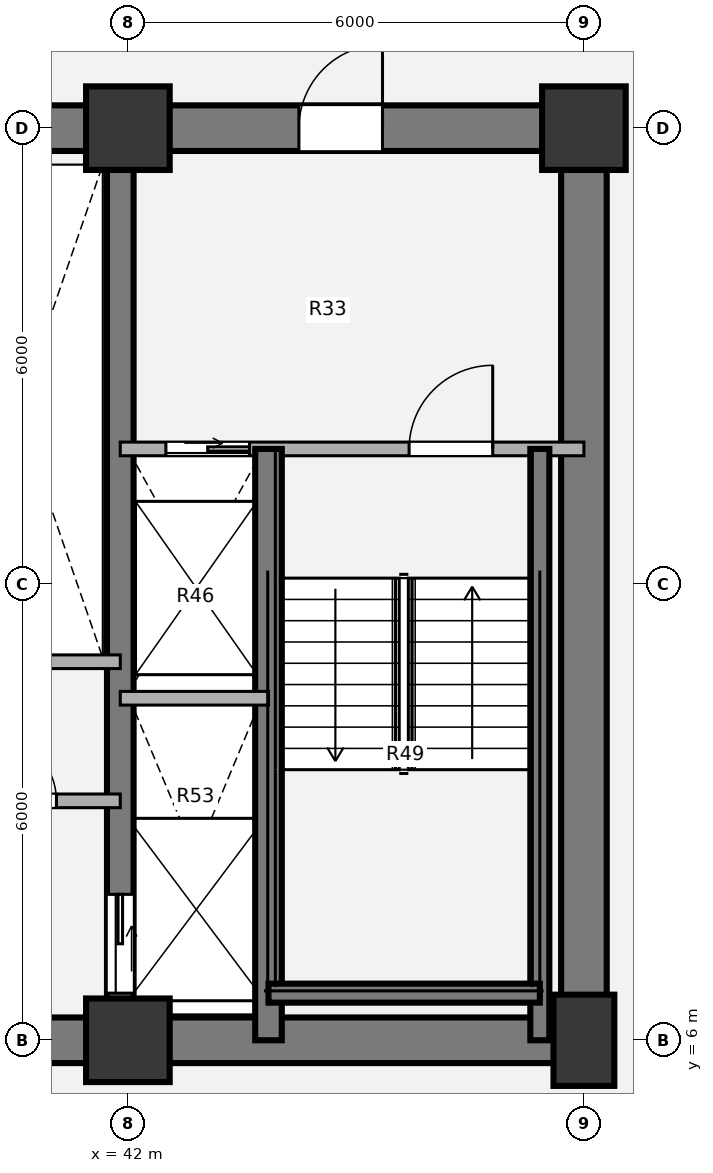
"""IFC4 building model, lengths in metres.
Left out: names, types, materials, properties, quantities, classifications, styles, units other than length and angle.
Written with IfcOpenShell. Run it as: python <this file> out.ifc"""

import sys

from ifc_helpers import new_model, si_unit, direction, frame, frame_2d, origin, origin_2d, place, context, subcontext, project, spatial, rectangle, extrude, source, transform, mapped, element, fill, save


model = new_model("IFC4")
c1 = context("Model", 3, precision=1e-05, world=origin(), true_north=direction((0.0, 1.0)))
c2 = subcontext(c1, "Body", "Model", "MODEL_VIEW")
j1 = project(units=[si_unit("LENGTHUNIT", "METRE"), si_unit("PLANEANGLEUNIT", "RADIAN")], contexts=[c1])
p1 = place(None, origin())
s1 = spatial("IfcSite", under=j1, at=p1, CompositionType="ELEMENT")
p2 = place(p1, origin())
s2 = spatial("IfcBuilding", under=s1, at=p2, CompositionType="ELEMENT")
p3 = place(p2, frame((0.0, 0.0, 68.58)))
s3 = spatial("IfcBuildingStorey", under=s2, at=p3, CompositionType="ELEMENT", Elevation=68.58)
m1 = source(origin(), c2, "Body", "SweptSolid", [
    extrude(rectangle(XDim=1.1, YDim=1.1, at=origin_2d()), origin(), (0.0, 0.0, 1.0), 3.78),
])
p4 = place(p3, frame((42.0, 6.0, 0.0), z_axis=(0.0, 0.0, 1.0), x_axis=(1.0, 0.0, 0.0)))
e1 = element("IfcColumn", 1, at=p4, inside=s3, PredefinedType="COLUMN", context=c2, shape_type="MappedRepresentation", body=[
    mapped(m1, transform((0.0, 0.0, 0.0), x_axis=(1.0, 0.0, 0.0), y_axis=(0.0, 1.0, 0.0), z_axis=(0.0, 0.0, 1.0), scale=1.0)),
])
m2 = source(origin(), c2, "Body", "SweptSolid", [
    extrude(rectangle(XDim=0.8, YDim=1.2, at=origin_2d()), origin(), (0.0, 0.0, 1.0), 3.78),
])
p5 = place(p3, frame((48.0, 6.0, 0.0), z_axis=(0.0, 0.0, 1.0), x_axis=(1.0, 0.0, 0.0)))
e2 = element("IfcColumn", 2, at=p5, inside=s3, PredefinedType="COLUMN", context=c2, shape_type="MappedRepresentation", body=[
    mapped(m2, transform((0.0, 0.0, 0.0), x_axis=(1.0, 0.0, 0.0), y_axis=(0.0, 1.0, 0.0), z_axis=(0.0, 0.0, 1.0), scale=1.0)),
])
for number, where, z_axis, x_axis in (
    (3, (42.0, 18.0, 0.0), (0.0, 0.0, 1.0), (1.0, 0.0, 0.0)),
    (4, (48.0, 18.0, 0.0), (0.0, 0.0, 1.0), (1.0, 0.0, 0.0)),
):
    element("IfcColumn", number, at=place(p3, frame(where, z_axis=z_axis, x_axis=x_axis)), inside=s3, PredefinedType="COLUMN", context=c2, shape_type="MappedRepresentation", body=[
        mapped(m1, transform((0.0, 0.0, 0.0), x_axis=(1.0, 0.0, 0.0), y_axis=(0.0, 1.0, 0.0), z_axis=(0.0, 0.0, 1.0), scale=1.0)),
    ])
p6 = place(p3, frame((48.3, 6.0, 0.0), z_axis=(0.0, 0.0, 1.0), x_axis=(-1.0, 0.0, 0.0)))
e5 = element("IfcWall", 5, at=p6, inside=s3, PredefinedType="SHEAR", context=c2, shape_type="SweptSolid", body=[
    extrude(rectangle(XDim=24.6, YDim=0.6, at=frame_2d((12.3, 0.0))), origin(), (0.0, 0.0, 1.0), 3.78),
])
p7 = place(p3, frame((48.0, 18.0, 0.0), z_axis=(0.0, 0.0, 1.0), x_axis=(0.0, -1.0, 0.0)))
e6 = element("IfcWall", 6, at=p7, inside=s3, PredefinedType="SHEAR", context=c2, shape_type="SweptSolid", body=[
    extrude(rectangle(XDim=12.0, YDim=0.6, at=frame_2d((6.0, 0.0))), origin(), (0.0, 0.0, 1.0), 3.78),
])
p8 = place(p3, frame((38.8, 18.0, 0.0), z_axis=(0.0, 0.0, 1.0), x_axis=(1.0, 0.0, 0.0)))
e7 = element("IfcWall", 7, at=p8, inside=s3, PredefinedType="SHEAR", context=c2, shape_type="SweptSolid", body=[
    extrude(rectangle(XDim=9.5, YDim=0.6, at=frame_2d((4.75, 0.0))), origin(), (0.0, 0.0, 1.0), 3.78),
])
p9 = place(p8, frame((5.45, 0.0, 0.0)))
e8 = element("IfcOpeningElement", 8, at=p9, cuts=e7, PredefinedType="OPENING", context=c2, shape_type="SweptSolid", body=[
    extrude(rectangle(XDim=1.1, YDim=2.1, at=origin_2d()), frame((0.55, 0.31, 1.05), z_axis=(0.0, -1.0, 0.0), x_axis=(1.0, 0.0, 0.0)), (0.0, 0.0, 1.0), 0.62),
])
p10 = place(p3, frame((41.9, 18.0, 0.0), z_axis=(0.0, 0.0, 1.0), x_axis=(0.0, -1.0, 0.0)))
e9 = element("IfcWall", 9, at=p10, inside=s3, PredefinedType="SHEAR", context=c2, shape_type="SweptSolid", body=[
    extrude(rectangle(XDim=12.0, YDim=0.35, at=frame_2d((6.0, 0.0))), origin(), (0.0, 0.0, 1.0), 3.78),
])
p11 = place(p10, frame((10.08, 0.0, 0.0)))
e10 = element("IfcOpeningElement", 10, at=p11, cuts=e9, PredefinedType="OPENING", context=c2, shape_type="SweptSolid", body=[
    extrude(rectangle(XDim=1.3, YDim=2.1, at=origin_2d()), frame((0.65, 0.185, 1.05), z_axis=(0.0, -1.0, 0.0), x_axis=(1.0, 0.0, 0.0)), (0.0, 0.0, 1.0), 0.37),
])
p12 = place(p3, frame((39.35, 10.98, 0.0), z_axis=(0.0, 0.0, 1.0), x_axis=(1.0, 0.0, 0.0)))
e11 = element("IfcWall", 11, at=p12, inside=s3, PredefinedType="PARTITIONING", context=c2, shape_type="SweptSolid", body=[
    extrude(rectangle(XDim=2.55, YDim=0.18, at=frame_2d((1.275, 0.0))), origin(), (0.0, 0.0, 1.0), 3.5),
])
p13 = place(p3, frame((39.35, 9.15, 0.0), z_axis=(0.0, 0.0, 1.0), x_axis=(1.0, 0.0, 0.0)))
e12 = element("IfcWall", 12, at=p13, inside=s3, PredefinedType="PARTITIONING", context=c2, shape_type="SweptSolid", body=[
    extrude(rectangle(XDim=2.55, YDim=0.18, at=frame_2d((1.275, 0.0))), origin(), (0.0, 0.0, 1.0), 3.5),
])
p14 = place(p13, frame((0.85, 0.0, 0.0)))
e13 = element("IfcOpeningElement", 13, at=p14, cuts=e12, PredefinedType="OPENING", context=c2, shape_type="SweptSolid", body=[
    extrude(rectangle(XDim=0.86, YDim=2.1, at=origin_2d()), frame((0.43, 0.1, 1.05), z_axis=(0.0, -1.0, 0.0), x_axis=(1.0, 0.0, 0.0)), (0.0, 0.0, 1.0), 0.2),
])
p15 = place(p3, frame((41.9, 13.78, 0.0), z_axis=(0.0, 0.0, 1.0), x_axis=(1.0, 0.0, 0.0)))
e14 = element("IfcWall", 14, at=p15, inside=s3, PredefinedType="PARTITIONING", context=c2, shape_type="SweptSolid", body=[
    extrude(rectangle(XDim=6.1, YDim=0.18, at=frame_2d((3.05, 0.0))), origin(), (0.0, 0.0, 1.0), 3.5),
])
p16 = place(p15, frame((0.6, 0.0, 0.0)))
e15 = element("IfcOpeningElement", 15, at=p16, cuts=e14, PredefinedType="OPENING", context=c2, shape_type="SweptSolid", body=[
    extrude(rectangle(XDim=1.1, YDim=2.1, at=origin_2d()), frame((0.55, 0.1, 1.05), z_axis=(0.0, -1.0, 0.0), x_axis=(1.0, 0.0, 0.0)), (0.0, 0.0, 1.0), 0.2),
])
p17 = place(p15, frame((3.8, 0.0, 0.0)))
e16 = element("IfcOpeningElement", 16, at=p17, cuts=e14, PredefinedType="OPENING", context=c2, shape_type="SweptSolid", body=[
    extrude(rectangle(XDim=1.1, YDim=2.1, at=origin_2d()), frame((0.55, 0.1, 1.05), z_axis=(0.0, -1.0, 0.0), x_axis=(1.0, 0.0, 0.0)), (0.0, 0.0, 1.0), 0.2),
])
p18 = place(p3, frame((43.85, 6.0, 0.0), z_axis=(0.0, 0.0, 1.0), x_axis=(0.0, 1.0, 0.0)))
e17 = element("IfcWall", 17, at=p18, inside=s3, PredefinedType="SHEAR", context=c2, shape_type="SweptSolid", body=[
    extrude(rectangle(XDim=7.78, YDim=0.35, at=frame_2d((3.89, 0.0))), origin(), (0.0, 0.0, 1.0), 3.85),
])
p19 = place(p3, frame((47.42, 6.0, 0.0), z_axis=(0.0, 0.0, 1.0), x_axis=(0.0, 1.0, 0.0)))
e18 = element("IfcWall", 18, at=p19, inside=s3, PredefinedType="SHEAR", context=c2, shape_type="SweptSolid", body=[
    extrude(rectangle(XDim=7.78, YDim=0.25, at=frame_2d((3.89, 0.0))), origin(), (0.0, 0.0, 1.0), 3.85),
])
p20 = place(p3, frame((43.85, 6.62, 0.0), z_axis=(0.0, 0.0, 1.0), x_axis=(1.0, 0.0, 0.0)))
e19 = element("IfcWall", 19, at=p20, inside=s3, PredefinedType="SHEAR", context=c2, shape_type="SweptSolid", body=[
    extrude(rectangle(XDim=3.57, YDim=0.25, at=frame_2d((1.785, 0.0))), origin(), (0.0, 0.0, 1.0), 3.85),
])
p21 = place(p3, frame((41.9, 10.5, 0.0), z_axis=(0.0, 0.0, 1.0), x_axis=(1.0, 0.0, 0.0)))
e20 = element("IfcWall", 20, at=p21, inside=s3, PredefinedType="PARTITIONING", context=c2, shape_type="SweptSolid", body=[
    extrude(rectangle(XDim=1.95, YDim=0.18, at=frame_2d((0.975, 0.0))), origin(), (0.0, 0.0, 1.0), 3.5),
])
m3 = source(origin(), c2, "Body", "SweptSolid", [
    extrude(rectangle(XDim=0.86, YDim=2.1, at=origin_2d()), frame((0.43, 0.025, 1.05), z_axis=(0.0, -1.0, 0.0), x_axis=(1.0, 0.0, 0.0)), (0.0, 0.0, 1.0), 0.05),
])
p22 = place(p14, origin())
e21 = element("IfcDoor", 21, at=p22, inside=s3, OperationType="SINGLE_SWING_LEFT", PredefinedType="DOOR", context=c2, shape_type="MappedRepresentation", body=[
    mapped(m3, transform((0.0, 0.0, 0.0), x_axis=(1.0, 0.0, 0.0), y_axis=(0.0, 1.0, 0.0), z_axis=(0.0, 0.0, 1.0), scale=1.0)),
])
fill(e13, e21)
m4 = source(origin(), c2, "Body", "SweptSolid", [
    extrude(rectangle(XDim=1.1, YDim=2.1, at=origin_2d()), frame((0.55, 0.025, 1.05), z_axis=(0.0, -1.0, 0.0), x_axis=(1.0, 0.0, 0.0)), (0.0, 0.0, 1.0), 0.05),
])
p23 = place(p16, origin())
e22 = element("IfcDoor", 22, at=p23, inside=s3, OperationType="SLIDING_TO_RIGHT", PredefinedType="DOOR", context=c2, shape_type="MappedRepresentation", body=[
    mapped(m4, transform((0.0, 0.0, 0.0), x_axis=(1.0, 0.0, 0.0), y_axis=(0.0, 1.0, 0.0), z_axis=(0.0, 0.0, 1.0), scale=1.0)),
])
fill(e15, e22)
m5 = source(origin(), c2, "Body", "SweptSolid", [
    extrude(rectangle(XDim=1.1, YDim=2.1, at=origin_2d()), frame((0.55, 0.025, 1.05), z_axis=(0.0, -1.0, 0.0), x_axis=(1.0, 0.0, 0.0)), (0.0, 0.0, 1.0), 0.05),
])
p24 = place(p17, origin())
e23 = element("IfcDoor", 23, at=p24, inside=s3, OperationType="SINGLE_SWING_RIGHT", PredefinedType="DOOR", context=c2, shape_type="MappedRepresentation", body=[
    mapped(m5, transform((0.0, 0.0, 0.0), x_axis=(1.0, 0.0, 0.0), y_axis=(0.0, 1.0, 0.0), z_axis=(0.0, 0.0, 1.0), scale=1.0)),
])
fill(e16, e23)
m6 = source(origin(), c2, "Body", "SweptSolid", [
    extrude(rectangle(XDim=1.3, YDim=2.1, at=origin_2d()), frame((0.65, 0.025, 1.05), z_axis=(0.0, -1.0, 0.0), x_axis=(1.0, 0.0, 0.0)), (0.0, 0.0, 1.0), 0.05),
])
p25 = place(p11, origin())
e24 = element("IfcDoor", 24, at=p25, inside=s3, OperationType="SLIDING_TO_LEFT", PredefinedType="DOOR", context=c2, shape_type="MappedRepresentation", body=[
    mapped(m6, transform((0.0, 0.0, 0.0), x_axis=(1.0, 0.0, 0.0), y_axis=(0.0, 1.0, 0.0), z_axis=(0.0, 0.0, 1.0), scale=1.0)),
])
fill(e10, e24)
m7 = source(origin(), c2, "Body", "SweptSolid", [
    extrude(rectangle(XDim=1.1, YDim=2.1, at=origin_2d()), frame((0.55, 0.025, 1.05), z_axis=(0.0, -1.0, 0.0), x_axis=(1.0, 0.0, 0.0)), (0.0, 0.0, 1.0), 0.05),
])
p26 = place(p9, origin())
e25 = element("IfcDoor", 25, at=p26, inside=s3, OperationType="SINGLE_SWING_RIGHT", PredefinedType="DOOR", context=c2, shape_type="MappedRepresentation", body=[
    mapped(m7, transform((0.0, 0.0, 0.0), x_axis=(1.0, 0.0, 0.0), y_axis=(0.0, 1.0, 0.0), z_axis=(0.0, 0.0, 1.0), scale=1.0)),
])
fill(e8, e25)
save(model, sys.argv[1])
